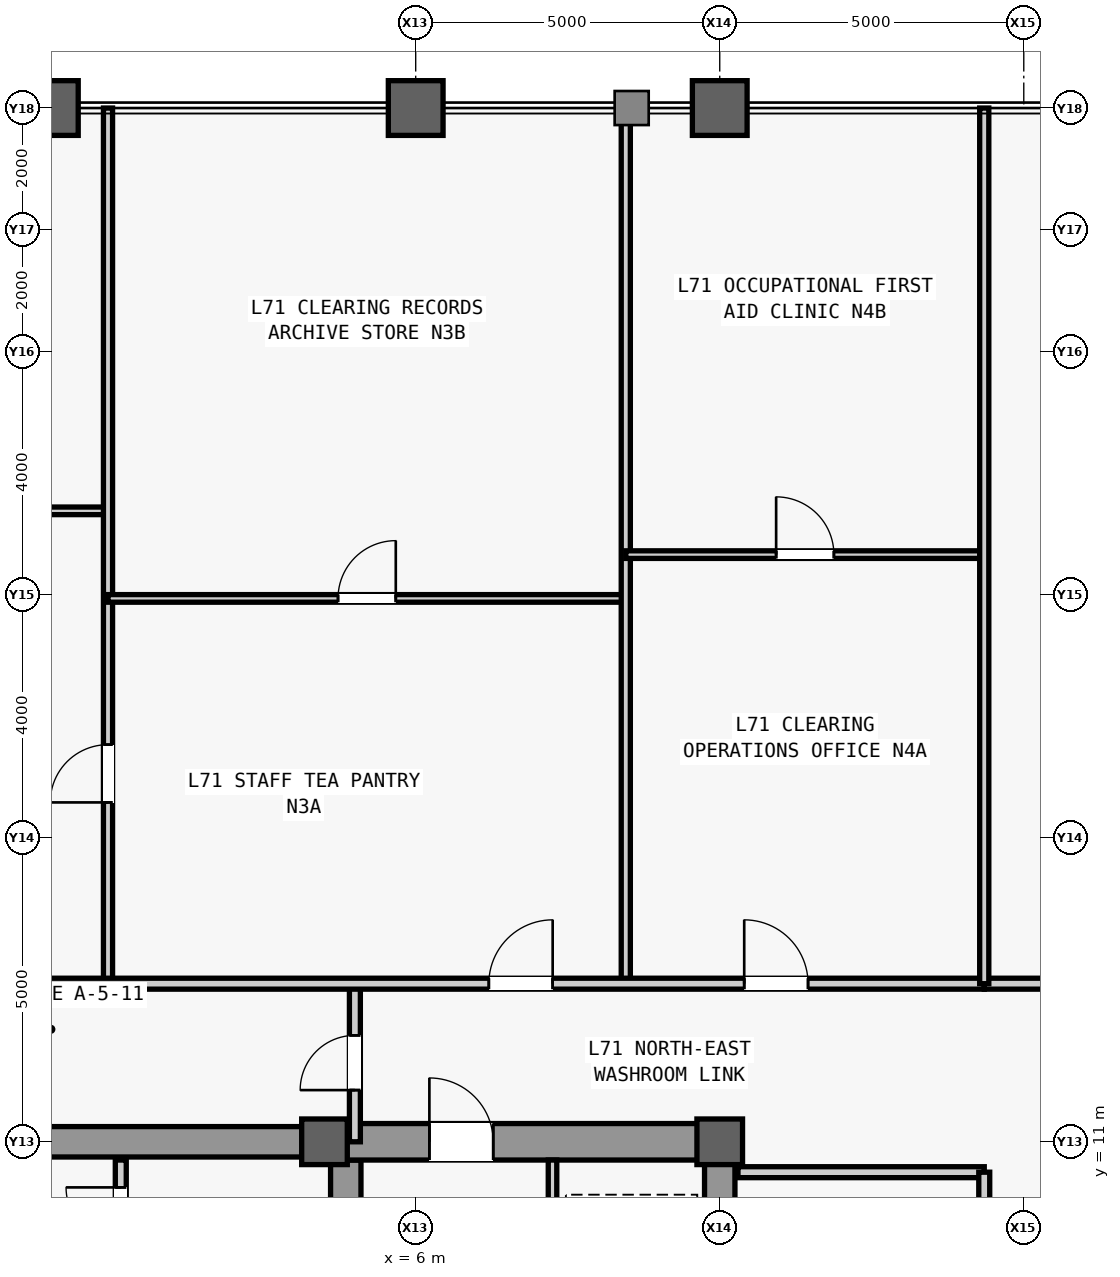
"""IFC4 building model, lengths in metres.
Left out: names, types, materials, properties, quantities, classifications, styles, units other than length and angle.
Written with IfcOpenShell. Run it as: python <this file> out.ifc"""

import sys

from ifc_helpers import new_model, si_unit, direction, frame, frame_2d, origin, origin_2d, place, context, subcontext, project, spatial, rectangle, hollow_rectangle, extrude, source, transform, mapped, element, fill, save


model = new_model("IFC4")
c1 = context("Model", 3, precision=1e-05, world=origin(), true_north=direction((0.0, 1.0)))
c2 = subcontext(c1, "Body", "Model", "MODEL_VIEW")
j1 = project(units=[si_unit("LENGTHUNIT", "METRE"), si_unit("PLANEANGLEUNIT", "RADIAN")], contexts=[c1])
p1 = place(None, origin())
s1 = spatial("IfcSite", under=j1, at=p1, CompositionType="ELEMENT")
p2 = place(p1, origin())
s2 = spatial("IfcBuilding", under=s1, at=p2, CompositionType="ELEMENT")
p3 = place(p2, frame((0.0, 0.0, 301.5)))
s3 = spatial("IfcBuildingStorey", under=s2, at=p3, CompositionType="ELEMENT", Elevation=301.5)
m1 = source(origin(), c2, "Body", "SweptSolid", [
    extrude(rectangle(XDim=22.0, YDim=0.5, at=frame_2d((11.0, 0.0))), origin(), (0.0, 0.0, 1.0), 3.78),
])
p4 = place(p3, frame((11.0, -11.0, 0.0), z_axis=(0.0, 0.0, 1.0), x_axis=(0.0, 1.0, 0.0)))
e1 = element("IfcWall", 1, at=p4, inside=s3, PredefinedType="SHEAR", context=c2, shape_type="MappedRepresentation", body=[
    mapped(m1, transform((0.0, 0.0, 0.0), scale=1.0)),
])
m2 = source(origin(), c2, "Body", "SweptSolid", [
    extrude(rectangle(XDim=1.1, YDim=2.2, at=frame_2d((0.55, 1.1))), frame((0.0, 0.26, 0.0), z_axis=(0.0, -1.0, 0.0), x_axis=(1.0, 0.0, 0.0)), (0.0, 0.0, 1.0), 0.52),
])
p5 = place(p4, frame((0.8, 0.0, 0.0)))
e2 = element("IfcOpeningElement", 2, at=p5, cuts=e1, PredefinedType="OPENING", context=c2, shape_type="MappedRepresentation", body=[
    mapped(m2, transform((0.0, 0.0, 0.0), scale=1.0)),
])
m3 = source(origin(), c2, "Body", "SweptSolid", [
    extrude(rectangle(XDim=0.9, YDim=2.15, at=frame_2d((0.45, 1.075))), frame((0.0, 0.26, 0.0), z_axis=(0.0, -1.0, 0.0), x_axis=(1.0, 0.0, 0.0)), (0.0, 0.0, 1.0), 0.52),
])
p6 = place(p4, frame((6.2, 0.0, 0.0)))
e3 = element("IfcOpeningElement", 3, at=p6, cuts=e1, PredefinedType="OPENING", context=c2, shape_type="MappedRepresentation", body=[
    mapped(m3, transform((0.0, 0.0, 0.0), scale=1.0)),
])
p7 = place(p4, frame((8.05, 0.0, 0.0)))
e4 = element("IfcOpeningElement", 4, at=p7, cuts=e1, PredefinedType="OPENING", context=c2, shape_type="MappedRepresentation", body=[
    mapped(m3, transform((0.0, 0.0, 0.0), scale=1.0)),
])
m4 = source(origin(), c2, "Body", "SweptSolid", [
    extrude(rectangle(XDim=1.2, YDim=2.3, at=frame_2d((0.6, 1.15))), frame((0.0, 0.26, 0.0), z_axis=(0.0, -1.0, 0.0), x_axis=(1.0, 0.0, 0.0)), (0.0, 0.0, 1.0), 0.52),
])
p8 = place(p4, frame((17.6, 0.0, 0.0)))
e5 = element("IfcOpeningElement", 5, at=p8, cuts=e1, PredefinedType="OPENING", context=c2, shape_type="MappedRepresentation", body=[
    mapped(m4, transform((0.0, 0.0, 0.0), scale=1.0)),
])
p9 = place(p4, frame((19.6, 0.0, 0.0)))
e6 = element("IfcOpeningElement", 6, at=p9, cuts=e1, PredefinedType="OPENING", context=c2, shape_type="MappedRepresentation", body=[
    mapped(m4, transform((0.0, 0.0, 0.0), scale=1.0)),
])
m5 = source(origin(), c2, "Body", "SweptSolid", [
    extrude(rectangle(XDim=1.3, YDim=2.3, at=frame_2d((0.65, 1.15))), frame((0.0, 0.26, 0.0), z_axis=(0.0, -1.0, 0.0), x_axis=(1.0, 0.0, 0.0)), (0.0, 0.0, 1.0), 0.52),
])
p10 = place(p4, frame((2.7, 0.0, 0.0)))
e7 = element("IfcOpeningElement", 7, at=p10, cuts=e1, PredefinedType="OPENING", context=c2, shape_type="MappedRepresentation", body=[
    mapped(m5, transform((0.0, 0.0, 0.0), scale=1.0)),
])
p11 = place(p4, frame((13.35, 0.0, 0.0)))
e8 = element("IfcOpeningElement", 8, at=p11, cuts=e1, PredefinedType="OPENING", context=c2, shape_type="MappedRepresentation", body=[
    mapped(m5, transform((0.0, 0.0, 0.0), scale=1.0)),
])
m6 = source(origin(), c2, "Body", "SweptSolid", [
    extrude(rectangle(XDim=21.4, YDim=0.5, at=frame_2d((10.7, 0.0))), origin(), (0.0, 0.0, 1.0), 3.78),
])
p12 = place(p3, frame((4.85, -10.7, 0.0), z_axis=(0.0, 0.0, 1.0), x_axis=(0.0, 1.0, 0.0)))
e9 = element("IfcWall", 9, at=p12, inside=s3, PredefinedType="SHEAR", context=c2, shape_type="MappedRepresentation", body=[
    mapped(m6, transform((0.0, 0.0, 0.0), scale=1.0)),
])
m7 = source(origin(), c2, "Body", "SweptSolid", [
    extrude(rectangle(XDim=5.9, YDim=0.6, at=frame_2d((2.95, 0.0))), origin(), (0.0, 0.0, 1.0), 3.78),
])
p13 = place(p3, frame((4.85, 11.0, 0.0), z_axis=(0.0, 0.0, 1.0), x_axis=(1.0, 0.0, 0.0)))
e10 = element("IfcWall", 10, at=p13, inside=s3, PredefinedType="SHEAR", context=c2, shape_type="MappedRepresentation", body=[
    mapped(m7, transform((0.0, 0.0, 0.0), scale=1.0)),
])
m8 = source(origin(), c2, "Body", "SweptSolid", [
    extrude(rectangle(XDim=1.05, YDim=2.2, at=frame_2d((0.525, 1.1))), frame((0.0, 0.31, 0.0), z_axis=(0.0, -1.0, 0.0), x_axis=(1.0, 0.0, 0.0)), (0.0, 0.0, 1.0), 0.62),
])
p14 = place(p13, frame((1.375, 0.0, 0.0)))
e11 = element("IfcOpeningElement", 11, at=p14, cuts=e10, PredefinedType="OPENING", context=c2, shape_type="MappedRepresentation", body=[
    mapped(m8, transform((0.0, 0.0, 0.0), scale=1.0)),
])
m9 = source(origin(), c2, "Body", "SweptSolid", [
    extrude(rectangle(XDim=9.2, YDim=0.5, at=frame_2d((4.6, 0.0))), origin(), (0.0, 0.0, 1.0), 3.78),
])
p15 = place(p3, frame((-4.6, 11.0, 0.0), z_axis=(0.0, 0.0, 1.0), x_axis=(1.0, 0.0, 0.0)))
e12 = element("IfcWall", 12, at=p15, inside=s3, PredefinedType="SHEAR", context=c2, shape_type="MappedRepresentation", body=[
    mapped(m9, transform((0.0, 0.0, 0.0), scale=1.0)),
])
m10 = source(origin(), c2, "Body", "SweptSolid", [
    extrude(hollow_rectangle(XDim=0.9, YDim=0.9, WallThickness=0.05, at=origin_2d()), origin(), (0.0, 0.0, 1.0), 4.0),
])
p16 = place(p3, frame((0.0, 28.0, 0.0), z_axis=(0.0, 0.0, 1.0), x_axis=(1.0, 0.0, 0.0)))
e13 = element("IfcColumn", 13, at=p16, inside=s3, PredefinedType="COLUMN", context=c2, shape_type="MappedRepresentation", body=[
    mapped(m10, transform((0.0, 0.0, 0.0), scale=1.0)),
])
m11 = source(origin(), c2, "Body", "SweptSolid", [
    extrude(rectangle(XDim=0.75, YDim=0.75, at=origin_2d()), origin(), (0.0, 0.0, 1.0), 4.0),
])
p17 = place(p3, frame((4.5, 11.0, 0.0), z_axis=(0.0, 0.0, 1.0), x_axis=(1.0, 0.0, 0.0)))
e14 = element("IfcColumn", 14, at=p17, inside=s3, PredefinedType="COLUMN", context=c2, shape_type="MappedRepresentation", body=[
    mapped(m11, transform((0.0, 0.0, 0.0), scale=1.0)),
])
p18 = place(p3, frame((6.0, 28.0, 0.0), z_axis=(0.0, 0.0, 1.0), x_axis=(1.0, 0.0, 0.0)))
e15 = element("IfcColumn", 15, at=p18, inside=s3, PredefinedType="COLUMN", context=c2, shape_type="MappedRepresentation", body=[
    mapped(m10, transform((0.0, 0.0, 0.0), scale=1.0)),
])
p19 = place(p3, frame((11.0, 11.0, 0.0), z_axis=(0.0, 0.0, 1.0), x_axis=(1.0, 0.0, 0.0)))
e16 = element("IfcColumn", 16, at=p19, inside=s3, PredefinedType="COLUMN", context=c2, shape_type="MappedRepresentation", body=[
    mapped(m11, transform((0.0, 0.0, 0.0), scale=1.0)),
])
p20 = place(p3, frame((11.0, 28.0, 0.0), z_axis=(0.0, 0.0, 1.0), x_axis=(1.0, 0.0, 0.0)))
e17 = element("IfcColumn", 17, at=p20, inside=s3, PredefinedType="COLUMN", context=c2, shape_type="MappedRepresentation", body=[
    mapped(m10, transform((0.0, 0.0, 0.0), scale=1.0)),
])
m12 = source(origin(), c2, "Body", "SweptSolid", [
    extrude(rectangle(XDim=9.4, YDim=0.14, at=frame_2d((4.7, 0.0))), origin(), (0.0, 0.0, 1.0), 3.78),
])
p21 = place(p3, frame((8.25, 1.3, 0.0), z_axis=(0.0, 0.0, 1.0), x_axis=(0.0, 1.0, 0.0)))
e18 = element("IfcWall", 18, at=p21, inside=s3, PredefinedType="PARTITIONING", context=c2, shape_type="MappedRepresentation", body=[
    mapped(m12, transform((0.0, 0.0, 0.0), scale=1.0)),
])
m13 = source(origin(), c2, "Body", "SweptSolid", [
    extrude(rectangle(XDim=4.05, YDim=0.18, at=frame_2d((2.025, 0.0))), origin(), (0.0, 0.0, 1.0), 3.78),
])
p22 = place(p3, frame((11.3, 10.5, 0.0), z_axis=(0.0, 0.0, 1.0), x_axis=(1.0, 0.0, 0.0)))
e19 = element("IfcWall", 19, at=p22, inside=s3, PredefinedType="PARTITIONING", context=c2, shape_type="MappedRepresentation", body=[
    mapped(m13, transform((0.0, 0.0, 0.0), scale=1.0)),
])
m14 = source(origin(), c2, "Body", "SweptSolid", [
    extrude(rectangle(XDim=16.6, YDim=0.18, at=frame_2d((8.3, 0.0))), origin(), (0.0, 0.0, 1.0), 3.78),
])
p23 = place(p3, frame((15.35, -6.1, 0.0), z_axis=(0.0, 0.0, 1.0), x_axis=(0.0, 1.0, 0.0)))
e20 = element("IfcWall", 20, at=p23, inside=s3, PredefinedType="PARTITIONING", context=c2, shape_type="MappedRepresentation", body=[
    mapped(m14, transform((0.0, 0.0, 0.0), scale=1.0)),
])
m15 = source(origin(), c2, "Body", "SweptSolid", [
    extrude(rectangle(XDim=1.8, YDim=2.25, at=frame_2d((0.9, 1.125))), frame((0.0, 0.1, 0.0), z_axis=(0.0, -1.0, 0.0), x_axis=(1.0, 0.0, 0.0)), (0.0, 0.0, 1.0), 0.2),
])
p24 = place(p23, frame((2.7, 0.0, 0.0)))
e21 = element("IfcOpeningElement", 21, at=p24, cuts=e20, PredefinedType="OPENING", context=c2, shape_type="MappedRepresentation", body=[
    mapped(m15, transform((0.0, 0.0, 0.0), scale=1.0)),
])
p25 = place(p23, frame((13.0, 0.0, 0.0)))
e22 = element("IfcOpeningElement", 22, at=p25, cuts=e20, PredefinedType="OPENING", context=c2, shape_type="MappedRepresentation", body=[
    mapped(m15, transform((0.0, 0.0, 0.0), scale=1.0)),
])
m16 = source(origin(), c2, "Body", "SweptSolid", [
    extrude(rectangle(XDim=5.4, YDim=0.18, at=frame_2d((2.7, 0.0))), origin(), (0.0, 0.0, 1.0), 3.78),
])
p26 = place(p3, frame((1.15, 5.3, 0.0), z_axis=(0.0, 0.0, 1.0), x_axis=(0.0, 1.0, 0.0)))
e23 = element("IfcWall", 23, at=p26, inside=s3, PredefinedType="PARTITIONING", context=c2, shape_type="MappedRepresentation", body=[
    mapped(m16, transform((0.0, 0.0, 0.0), scale=1.0)),
])
m17 = source(origin(), c2, "Body", "SweptSolid", [
    extrude(rectangle(XDim=0.9, YDim=2.15, at=frame_2d((0.45, 1.075))), frame((0.0, 0.1, 0.0), z_axis=(0.0, -1.0, 0.0), x_axis=(1.0, 0.0, 0.0)), (0.0, 0.0, 1.0), 0.2),
])
p27 = place(p26, frame((0.45, 0.0, 0.0)))
e24 = element("IfcOpeningElement", 24, at=p27, cuts=e23, PredefinedType="OPENING", context=c2, shape_type="MappedRepresentation", body=[
    mapped(m17, transform((0.0, 0.0, 0.0), scale=1.0)),
])
p28 = place(p26, frame((2.25, 0.0, 0.0)))
e25 = element("IfcOpeningElement", 25, at=p28, cuts=e23, PredefinedType="OPENING", context=c2, shape_type="MappedRepresentation", body=[
    mapped(m17, transform((0.0, 0.0, 0.0), scale=1.0)),
])
p29 = place(p26, frame((4.05, 0.0, 0.0)))
e26 = element("IfcOpeningElement", 26, at=p29, cuts=e23, PredefinedType="OPENING", context=c2, shape_type="MappedRepresentation", body=[
    mapped(m17, transform((0.0, 0.0, 0.0), scale=1.0)),
])
m18 = source(origin(), c2, "Body", "SweptSolid", [
    extrude(rectangle(XDim=2.6, YDim=0.18, at=frame_2d((1.3, 0.0))), origin(), (0.0, 0.0, 1.0), 3.78),
])
p30 = place(p3, frame((5.0, 11.0, 0.0), z_axis=(0.0, 0.0, 1.0), x_axis=(0.0, 1.0, 0.0)))
e27 = element("IfcWall", 27, at=p30, inside=s3, PredefinedType="PARTITIONING", context=c2, shape_type="MappedRepresentation", body=[
    mapped(m18, transform((0.0, 0.0, 0.0), scale=1.0)),
])
p31 = place(p30, frame((0.85, 0.0, 0.0)))
e28 = element("IfcOpeningElement", 28, at=p31, cuts=e27, PredefinedType="OPENING", context=c2, shape_type="MappedRepresentation", body=[
    mapped(m17, transform((0.0, 0.0, 0.0), scale=1.0)),
])
m19 = source(origin(), c2, "Body", "SweptSolid", [
    extrude(rectangle(XDim=2.4, YDim=0.18, at=frame_2d((1.2, 0.0))), origin(), (0.0, 0.0, 1.0), 3.78),
])
p32 = place(p3, frame((15.35, 13.6, 0.0), z_axis=(0.0, 0.0, 1.0), x_axis=(1.0, 0.0, 0.0)))
e29 = element("IfcWall", 29, at=p32, inside=s3, PredefinedType="PARTITIONING", context=c2, shape_type="MappedRepresentation", body=[
    mapped(m19, transform((0.0, 0.0, 0.0), scale=1.0)),
])
m20 = source(origin(), c2, "Body", "SweptSolid", [
    extrude(rectangle(XDim=10.152, YDim=0.125, at=frame_2d((5.076, 0.0))), origin(), (0.0, 0.0, 1.0), 3.78),
])
p33 = place(p3, frame((-9.212, 21.376, 0.0), z_axis=(0.0, 0.0, 1.0), x_axis=(1.0, 0.0, 0.0)))
e30 = element("IfcWall", 30, at=p33, inside=s3, PredefinedType="PARTITIONING", context=c2, shape_type="MappedRepresentation", body=[
    mapped(m20, transform((0.0, 0.0, 0.0), scale=1.0)),
])
m21 = source(origin(), c2, "Body", "SweptSolid", [
    extrude(rectangle(XDim=0.95, YDim=2.15, at=frame_2d((0.475, 1.075))), frame((0.0, 0.073, 0.0), z_axis=(0.0, -1.0, 0.0), x_axis=(1.0, 0.0, 0.0)), (0.0, 0.0, 1.0), 0.145),
])
p34 = place(p33, frame((4.601, 0.0, 0.0)))
e31 = element("IfcOpeningElement", 31, at=p34, cuts=e30, PredefinedType="OPENING", context=c2, shape_type="MappedRepresentation", body=[
    mapped(m21, transform((0.0, 0.0, 0.0), scale=1.0)),
])
m22 = source(origin(), c2, "Body", "SweptSolid", [
    extrude(rectangle(XDim=14.4, YDim=0.15, at=frame_2d((7.2, 0.0))), origin(), (0.0, 0.0, 1.0), 3.78),
])
p35 = place(p3, frame((0.94, 13.6, 0.0), z_axis=(0.0, 0.0, 1.0), x_axis=(0.0, 1.0, 0.0)))
e32 = element("IfcWall", 32, at=p35, inside=s3, PredefinedType="PARTITIONING", context=c2, shape_type="MappedRepresentation", body=[
    mapped(m22, transform((0.0, 0.0, 0.0), scale=1.0)),
])
m23 = source(origin(), c2, "Body", "SweptSolid", [
    extrude(rectangle(XDim=0.95, YDim=2.15, at=frame_2d((0.475, 1.075))), frame((0.0, 0.085, 0.0), z_axis=(0.0, -1.0, 0.0), x_axis=(1.0, 0.0, 0.0)), (0.0, 0.0, 1.0), 0.17),
])
p36 = place(p35, frame((2.981, 0.0, 0.0)))
e33 = element("IfcOpeningElement", 33, at=p36, cuts=e32, PredefinedType="OPENING", context=c2, shape_type="MappedRepresentation", body=[
    mapped(m23, transform((0.0, 0.0, 0.0), scale=1.0)),
])
m24 = source(origin(), c2, "Body", "SweptSolid", [
    extrude(rectangle(XDim=8.515, YDim=0.125, at=frame_2d((4.258, 0.0))), origin(), (0.0, 0.0, 1.0), 3.78),
])
p37 = place(p3, frame((0.94, 19.936, 0.0), z_axis=(0.0, 0.0, 1.0), x_axis=(1.0, 0.0, 0.0)))
e34 = element("IfcWall", 34, at=p37, inside=s3, PredefinedType="PARTITIONING", context=c2, shape_type="MappedRepresentation", body=[
    mapped(m24, transform((0.0, 0.0, 0.0), scale=1.0)),
])
p38 = place(p37, frame((3.782, 0.0, 0.0)))
e35 = element("IfcOpeningElement", 35, at=p38, cuts=e34, PredefinedType="OPENING", context=c2, shape_type="MappedRepresentation", body=[
    mapped(m21, transform((0.0, 0.0, 0.0), scale=1.0)),
])
p39 = place(p3, frame((9.455, 13.6, 0.0), z_axis=(0.0, 0.0, 1.0), x_axis=(0.0, 1.0, 0.0)))
e36 = element("IfcWall", 36, at=p39, inside=s3, PredefinedType="PARTITIONING", context=c2, shape_type="MappedRepresentation", body=[
    mapped(m22, transform((0.0, 0.0, 0.0), scale=1.0)),
])
m25 = source(origin(), c2, "Body", "SweptSolid", [
    extrude(rectangle(XDim=5.895, YDim=0.125, at=frame_2d((2.948, 0.0))), origin(), (0.0, 0.0, 1.0), 3.78),
])
p40 = place(p3, frame((9.455, 20.656, 0.0), z_axis=(0.0, 0.0, 1.0), x_axis=(1.0, 0.0, 0.0)))
e37 = element("IfcWall", 37, at=p40, inside=s3, PredefinedType="PARTITIONING", context=c2, shape_type="MappedRepresentation", body=[
    mapped(m25, transform((0.0, 0.0, 0.0), scale=1.0)),
])
p41 = place(p40, frame((2.472, 0.0, 0.0)))
e38 = element("IfcOpeningElement", 38, at=p41, cuts=e37, PredefinedType="OPENING", context=c2, shape_type="MappedRepresentation", body=[
    mapped(m21, transform((0.0, 0.0, 0.0), scale=1.0)),
])
m26 = source(origin(), c2, "Body", "SweptSolid", [
    extrude(rectangle(XDim=32.75, YDim=0.18, at=frame_2d((16.375, 0.0))), origin(), (0.0, 0.0, 1.0), 3.78),
])
p42 = place(p3, frame((-17.4, 13.6, 0.0), z_axis=(0.0, 0.0, 1.0), x_axis=(1.0, 0.0, 0.0)))
e39 = element("IfcWall", 39, at=p42, inside=s3, PredefinedType="PARTITIONING", context=c2, shape_type="MappedRepresentation", body=[
    mapped(m26, transform((0.0, 0.0, 0.0), scale=1.0)),
])
m27 = source(origin(), c2, "Body", "SweptSolid", [
    extrude(rectangle(XDim=1.05, YDim=2.2, at=frame_2d((0.525, 1.1))), frame((0.0, 0.1, 0.0), z_axis=(0.0, -1.0, 0.0), x_axis=(1.0, 0.0, 0.0)), (0.0, 0.0, 1.0), 0.2),
])
p43 = place(p42, frame((24.603, 0.0, 0.0)))
e40 = element("IfcOpeningElement", 40, at=p43, cuts=e39, PredefinedType="OPENING", context=c2, shape_type="MappedRepresentation", body=[
    mapped(m27, transform((0.0, 0.0, 0.0), scale=1.0)),
])
p44 = place(p42, frame((28.802, 0.0, 0.0)))
e41 = element("IfcOpeningElement", 41, at=p44, cuts=e39, PredefinedType="OPENING", context=c2, shape_type="MappedRepresentation", body=[
    mapped(m27, transform((0.0, 0.0, 0.0), scale=1.0)),
])
p45 = place(p3, frame((15.35, 13.6, 0.0), z_axis=(0.0, 0.0, 1.0), x_axis=(0.0, 1.0, 0.0)))
e42 = element("IfcWall", 42, at=p45, inside=s3, PredefinedType="PARTITIONING", context=c2, shape_type="MappedRepresentation", body=[
    mapped(m22, transform((0.0, 0.0, 0.0), scale=1.0)),
])
m28 = source(origin(), c2, "Body", "SweptSolid", [
    extrude(rectangle(XDim=1.05, YDim=2.2, at=frame_2d((0.525, 1.1))), frame((0.0, 0.025, 0.0), z_axis=(0.0, -1.0, 0.0), x_axis=(1.0, 0.0, 0.0)), (0.0, 0.0, 1.0), 0.05),
])
p46 = place(p14, origin())
e43 = element("IfcDoor", 43, at=p46, inside=s3, OperationType="SINGLE_SWING_LEFT", PredefinedType="DOOR", context=c2, shape_type="MappedRepresentation", body=[
    mapped(m28, transform((0.0, 0.0, 0.0), scale=1.0)),
])
fill(e11, e43)
m29 = source(origin(), c2, "Body", "SweptSolid", [
    extrude(rectangle(XDim=0.9, YDim=2.15, at=frame_2d((0.45, 1.075))), frame((0.0, 0.025, 0.0), z_axis=(0.0, -1.0, 0.0), x_axis=(1.0, 0.0, 0.0)), (0.0, 0.0, 1.0), 0.05),
])
p47 = place(p29, origin())
e44 = element("IfcDoor", 44, at=p47, inside=s3, OperationType="SINGLE_SWING_RIGHT", PredefinedType="DOOR", context=c2, shape_type="MappedRepresentation", body=[
    mapped(m29, transform((0.0, 0.0, 0.0), scale=1.0)),
])
fill(e26, e44)
p48 = place(p31, origin())
e45 = element("IfcDoor", 45, at=p48, inside=s3, OperationType="SINGLE_SWING_LEFT", PredefinedType="DOOR", context=c2, shape_type="MappedRepresentation", body=[
    mapped(m29, transform((0.0, 0.0, 0.0), scale=1.0)),
])
fill(e28, e45)
m30 = source(origin(), c2, "Body", "SweptSolid", [
    extrude(rectangle(XDim=0.95, YDim=2.15, at=frame_2d((0.475, 1.075))), frame((0.0, 0.025, 0.0), z_axis=(0.0, -1.0, 0.0), x_axis=(1.0, 0.0, 0.0)), (0.0, 0.0, 1.0), 0.05),
])
p49 = place(p36, origin())
e46 = element("IfcDoor", 46, at=p49, inside=s3, OperationType="SINGLE_SWING_LEFT", PredefinedType="DOOR", context=c2, shape_type="MappedRepresentation", body=[
    mapped(m30, transform((0.0, 0.0, 0.0), scale=1.0)),
])
fill(e33, e46)
p50 = place(p38, origin())
e47 = element("IfcDoor", 47, at=p50, inside=s3, OperationType="SINGLE_SWING_RIGHT", PredefinedType="DOOR", context=c2, shape_type="MappedRepresentation", body=[
    mapped(m30, transform((0.0, 0.0, 0.0), scale=1.0)),
])
fill(e35, e47)
p51 = place(p41, origin())
e48 = element("IfcDoor", 48, at=p51, inside=s3, OperationType="SINGLE_SWING_LEFT", PredefinedType="DOOR", context=c2, shape_type="MappedRepresentation", body=[
    mapped(m30, transform((0.0, 0.0, 0.0), scale=1.0)),
])
fill(e38, e48)
p52 = place(p43, origin())
e49 = element("IfcDoor", 49, at=p52, inside=s3, OperationType="SINGLE_SWING_RIGHT", PredefinedType="DOOR", context=c2, shape_type="MappedRepresentation", body=[
    mapped(m28, transform((0.0, 0.0, 0.0), scale=1.0)),
])
fill(e40, e49)
p53 = place(p44, origin())
e50 = element("IfcDoor", 50, at=p53, inside=s3, OperationType="SINGLE_SWING_LEFT", PredefinedType="DOOR", context=c2, shape_type="MappedRepresentation", body=[
    mapped(m28, transform((0.0, 0.0, 0.0), scale=1.0)),
])
fill(e41, e50)
save(model, sys.argv[1])
